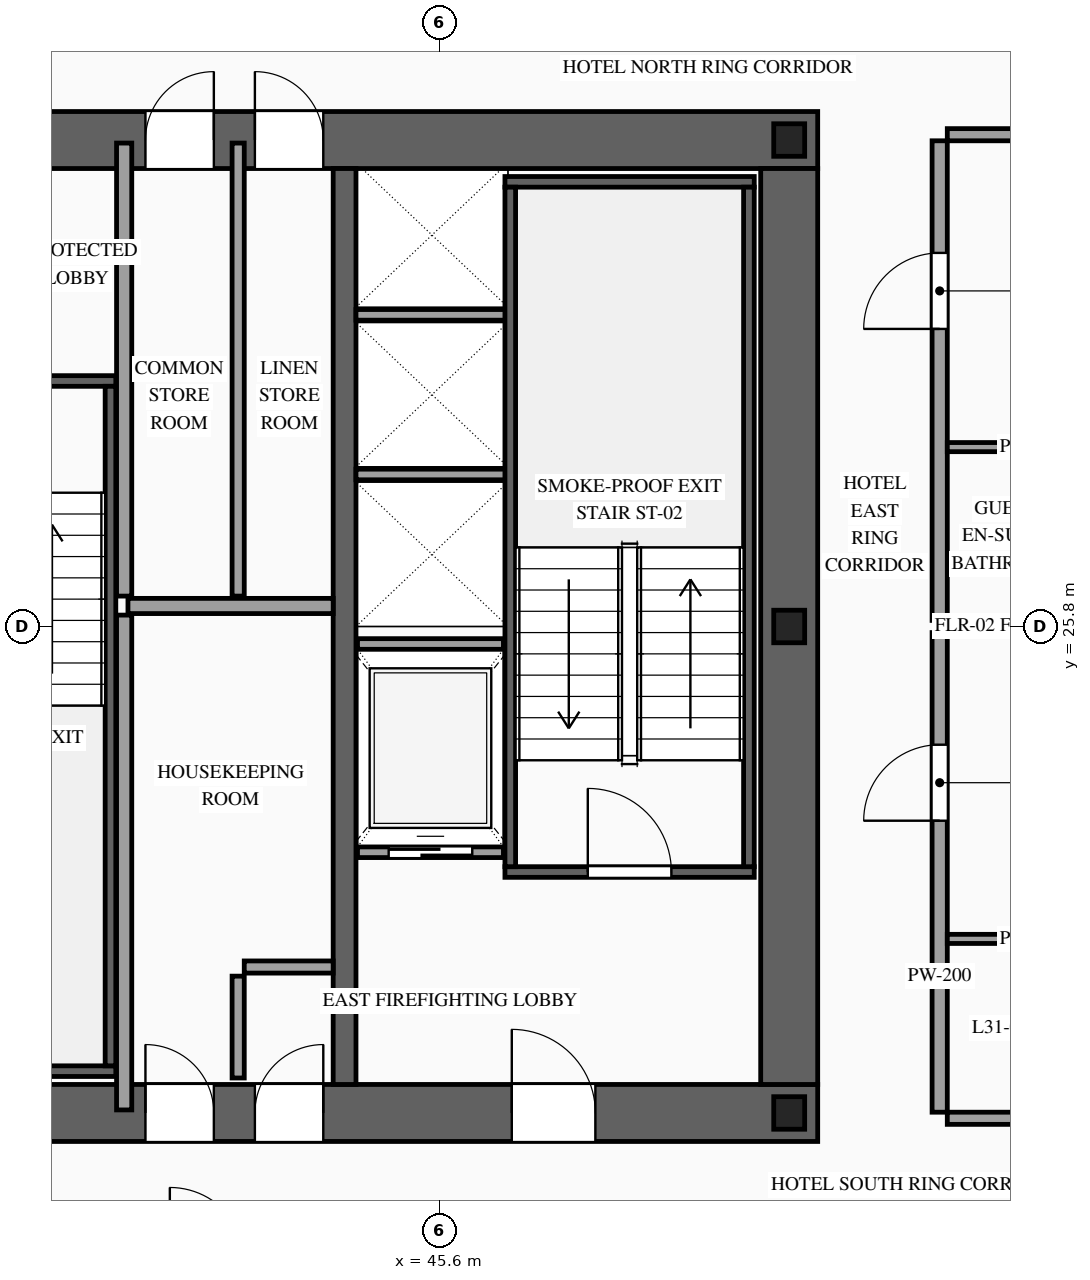
"""IFC4 building model, lengths in metres.
Left out: names, types, materials, properties, quantities, classifications, styles, units other than length and angle.
Written with IfcOpenShell. Run it as: python <this file> out.ifc"""

import sys

from ifc_helpers import new_model, si_unit, direction, frame, frame_2d, origin, origin_2d, place, context, subcontext, project, spatial, rectangle, i_section, extrude, source, transform, mapped, element, fill, save


model = new_model("IFC4")
c1 = context("Model", 3, precision=1e-05, world=origin(), true_north=direction((0.0, 1.0)))
c2 = subcontext(c1, "Body", "Model", "MODEL_VIEW")
j1 = project(units=[si_unit("LENGTHUNIT", "METRE"), si_unit("PLANEANGLEUNIT", "RADIAN")], contexts=[c1])
p1 = place(None, origin())
s1 = spatial("IfcSite", under=j1, at=p1, CompositionType="ELEMENT")
p2 = place(p1, origin())
s2 = spatial("IfcBuilding", under=s1, at=p2, CompositionType="ELEMENT")
p3 = place(p2, frame((0.0, 0.0, 119.0)))
s3 = spatial("IfcBuildingStorey", under=s2, at=p3, CompositionType="ELEMENT", Elevation=119.0)
p4 = place(p3, frame((23.425, 19.4, 0.0), z_axis=(0.0, 0.0, 1.0), x_axis=(1.0, 0.0, 0.0)))
e1 = element("IfcWall", 1, at=p4, inside=s3, PredefinedType="SHEAR", context=c2, shape_type="SweptSolid", body=[
    extrude(rectangle(XDim=27.15, YDim=0.75, at=frame_2d((13.575, 0.0))), origin(), (0.0, 0.0, 1.0), 3.6),
])
p5 = place(p4, frame((2.025, 0.0, 0.0)))
e2 = element("IfcOpeningElement", 2, at=p5, cuts=e1, PredefinedType="OPENING", context=c2, shape_type="SweptSolid", body=[
    extrude(rectangle(XDim=1.1, YDim=2.2, at=frame_2d((0.55, 1.1))), frame((0.0, 0.39, 0.0), z_axis=(0.0, -1.0, 0.0), x_axis=(1.0, 0.0, 0.0)), (0.0, 0.0, 1.0), 0.78),
])
p6 = place(p4, frame((9.925, 0.0, 0.0)))
e3 = element("IfcOpeningElement", 3, at=p6, cuts=e1, PredefinedType="OPENING", context=c2, shape_type="SweptSolid", body=[
    extrude(rectangle(XDim=1.1, YDim=2.2, at=frame_2d((0.55, 1.1))), frame((0.0, 0.39, 0.0), z_axis=(0.0, -1.0, 0.0), x_axis=(1.0, 0.0, 0.0)), (0.0, 0.0, 1.0), 0.78),
])
p7 = place(p4, frame((23.125, 0.0, 0.0)))
e4 = element("IfcOpeningElement", 4, at=p7, cuts=e1, PredefinedType="OPENING", context=c2, shape_type="SweptSolid", body=[
    extrude(rectangle(XDim=1.1, YDim=2.2, at=frame_2d((0.55, 1.1))), frame((0.0, 0.39, 0.0), z_axis=(0.0, -1.0, 0.0), x_axis=(1.0, 0.0, 0.0)), (0.0, 0.0, 1.0), 0.78),
])
p8 = place(p4, frame((19.745, 0.0, 0.0)))
e5 = element("IfcOpeningElement", 5, at=p8, cuts=e1, PredefinedType="OPENING", context=c2, shape_type="SweptSolid", body=[
    extrude(rectangle(XDim=0.9, YDim=2.15, at=frame_2d((0.45, 1.075))), frame((0.0, 0.39, 0.0), z_axis=(0.0, -1.0, 0.0), x_axis=(1.0, 0.0, 0.0)), (0.0, 0.0, 1.0), 0.78),
])
p9 = place(p4, frame((18.305, 0.0, 0.0)))
e6 = element("IfcOpeningElement", 6, at=p9, cuts=e1, PredefinedType="OPENING", context=c2, shape_type="SweptSolid", body=[
    extrude(rectangle(XDim=0.9, YDim=2.15, at=frame_2d((0.45, 1.075))), frame((0.0, 0.39, 0.0), z_axis=(0.0, -1.0, 0.0), x_axis=(1.0, 0.0, 0.0)), (0.0, 0.0, 1.0), 0.78),
])
p10 = place(p3, frame((23.425, 32.2, 0.0), z_axis=(0.0, 0.0, 1.0), x_axis=(1.0, 0.0, 0.0)))
e7 = element("IfcWall", 7, at=p10, inside=s3, PredefinedType="SHEAR", context=c2, shape_type="SweptSolid", body=[
    extrude(rectangle(XDim=27.15, YDim=0.75, at=frame_2d((13.575, 0.0))), origin(), (0.0, 0.0, 1.0), 3.6),
])
p11 = place(p10, frame((4.645, 0.0, 0.0)))
e8 = element("IfcOpeningElement", 8, at=p11, cuts=e7, PredefinedType="OPENING", context=c2, shape_type="SweptSolid", body=[
    extrude(rectangle(XDim=0.9, YDim=2.15, at=frame_2d((0.45, 1.075))), frame((0.0, 0.39, 0.0), z_axis=(0.0, -1.0, 0.0), x_axis=(1.0, 0.0, 0.0)), (0.0, 0.0, 1.0), 0.78),
])
p12 = place(p10, frame((9.925, 0.0, 0.0)))
e9 = element("IfcOpeningElement", 9, at=p12, cuts=e7, PredefinedType="OPENING", context=c2, shape_type="SweptSolid", body=[
    extrude(rectangle(XDim=1.1, YDim=2.2, at=frame_2d((0.55, 1.1))), frame((0.0, 0.39, 0.0), z_axis=(0.0, -1.0, 0.0), x_axis=(1.0, 0.0, 0.0)), (0.0, 0.0, 1.0), 0.78),
])
p13 = place(p10, frame((15.775, 0.0, 0.0)))
e10 = element("IfcOpeningElement", 10, at=p13, cuts=e7, PredefinedType="OPENING", context=c2, shape_type="SweptSolid", body=[
    extrude(rectangle(XDim=1.1, YDim=2.2, at=frame_2d((0.55, 1.1))), frame((0.0, 0.39, 0.0), z_axis=(0.0, -1.0, 0.0), x_axis=(1.0, 0.0, 0.0)), (0.0, 0.0, 1.0), 0.78),
])
p14 = place(p10, frame((18.305, 0.0, 0.0)))
e11 = element("IfcOpeningElement", 11, at=p14, cuts=e7, PredefinedType="OPENING", context=c2, shape_type="SweptSolid", body=[
    extrude(rectangle(XDim=0.9, YDim=2.15, at=frame_2d((0.45, 1.075))), frame((0.0, 0.39, 0.0), z_axis=(0.0, -1.0, 0.0), x_axis=(1.0, 0.0, 0.0)), (0.0, 0.0, 1.0), 0.78),
])
p15 = place(p10, frame((19.745, 0.0, 0.0)))
e12 = element("IfcOpeningElement", 12, at=p15, cuts=e7, PredefinedType="OPENING", context=c2, shape_type="SweptSolid", body=[
    extrude(rectangle(XDim=0.9, YDim=2.15, at=frame_2d((0.45, 1.075))), frame((0.0, 0.39, 0.0), z_axis=(0.0, -1.0, 0.0), x_axis=(1.0, 0.0, 0.0)), (0.0, 0.0, 1.0), 0.78),
])
m1 = source(origin(), c2, "Body", "SweptSolid", [
    extrude(rectangle(XDim=12.05, YDim=0.75, at=frame_2d((6.025, 0.0))), origin(), (0.0, 0.0, 1.0), 3.6),
])
p16 = place(p3, frame((50.2, 19.775, 0.0), z_axis=(0.0, 0.0, 1.0), x_axis=(0.0, 1.0, 0.0)))
e13 = element("IfcWall", 13, at=p16, inside=s3, PredefinedType="SHEAR", context=c2, shape_type="MappedRepresentation", body=[
    mapped(m1, transform((0.0, 0.0, 0.0), scale=1.0)),
])
m2 = source(origin(), c2, "Body", "SweptSolid", [
    extrude(rectangle(XDim=12.05, YDim=0.3, at=frame_2d((6.025, 0.0))), origin(), (0.0, 0.0, 1.0), 3.6),
])
p17 = place(p3, frame((44.35, 19.775, 0.0), z_axis=(0.0, 0.0, 1.0), x_axis=(0.0, 1.0, 0.0)))
e14 = element("IfcWall", 14, at=p17, inside=s3, PredefinedType="SOLIDWALL", context=c2, shape_type="MappedRepresentation", body=[
    mapped(m2, transform((0.0, 0.0, 0.0), scale=1.0)),
])
m3 = source(origin(), c2, "Body", "SweptSolid", [
    extrude(i_section(OverallWidth=0.407, OverallDepth=0.428, WebThickness=0.02, FlangeThickness=0.035, at=origin_2d()), origin(), (0.0, 0.0, 1.0), 3.6),
])
for number, where, z_axis, x_axis in (
    (15, (50.2, 19.4, 0.0), (0.0, 0.0, 1.0), (1.0, 0.0, 0.0)),
    (16, (50.2, 25.8, 0.0), (0.0, 0.0, 1.0), (1.0, 0.0, 0.0)),
    (17, (50.2, 32.2, 0.0), (0.0, 0.0, 1.0), (1.0, 0.0, 0.0)),
):
    element("IfcColumn", number, at=place(p3, frame(where, z_axis=z_axis, x_axis=x_axis)), inside=s3, PredefinedType="COLUMN", context=c2, shape_type="MappedRepresentation", body=[
        mapped(m3, transform((0.0, 0.0, 0.0), scale=1.0)),
    ])
p18 = place(p3, frame((44.52, 22.83, 0.0), z_axis=(0.0, 0.0, 1.0), x_axis=(1.0, 0.0, 0.0)))
e18 = element("IfcWall", 18, at=p18, inside=s3, PredefinedType="SOLIDWALL", context=c2, shape_type="SweptSolid", body=[
    extrude(rectangle(XDim=1.92, YDim=0.14, at=frame_2d((0.96, 0.0))), origin(), (0.0, 0.0, 1.0), 3.38),
])
p19 = place(p18, frame((0.41, 0.0, 0.0)))
e19 = element("IfcOpeningElement", 19, at=p19, cuts=e18, PredefinedType="OPENING", context=c2, shape_type="SweptSolid", body=[
    extrude(rectangle(XDim=1.1, YDim=2.2, at=frame_2d((0.55, 1.1))), frame((0.0, 0.085, 0.0), z_axis=(0.0, -1.0, 0.0), x_axis=(1.0, 0.0, 0.0)), (0.0, 0.0, 1.0), 0.17),
])
m4 = source(origin(), c2, "Body", "SweptSolid", [
    extrude(rectangle(XDim=1.92, YDim=0.14, at=frame_2d((0.96, 0.0))), origin(), (0.0, 0.0, 1.0), 3.38),
])
p20 = place(p3, frame((44.52, 25.57, 0.0), z_axis=(0.0, 0.0, 1.0), x_axis=(1.0, 0.0, 0.0)))
e20 = element("IfcWall", 20, at=p20, inside=s3, PredefinedType="SOLIDWALL", context=c2, shape_type="MappedRepresentation", body=[
    mapped(m4, transform((0.0, 0.0, 0.0), scale=1.0)),
])
m5 = source(origin(), c2, "Body", "SweptSolid", [
    extrude(rectangle(XDim=2.0, YDim=0.14, at=frame_2d((1.0, 0.0))), origin(), (0.0, 0.0, 1.0), 3.38),
])
for number, where, z_axis, x_axis in (
    (21, (44.5, 27.8, 0.0), (0.0, 0.0, 1.0), (1.0, 0.0, 0.0)),
    (22, (44.5, 29.9, 0.0), (0.0, 0.0, 1.0), (1.0, 0.0, 0.0)),
):
    element("IfcWall", number, at=place(p3, frame(where, z_axis=z_axis, x_axis=x_axis)), inside=s3, PredefinedType="SOLIDWALL", context=c2, shape_type="MappedRepresentation", body=[
        mapped(m5, transform((0.0, 0.0, 0.0), scale=1.0)),
    ])
p21 = place(p3, frame((46.46, 22.57, 0.0), z_axis=(0.0, 0.0, 1.0), x_axis=(1.0, 0.0, 0.0)))
e23 = element("IfcWall", 23, at=p21, inside=s3, PredefinedType="SOLIDWALL", context=c2, shape_type="SweptSolid", body=[
    extrude(rectangle(XDim=3.28, YDim=0.14, at=frame_2d((1.64, 0.0))), origin(), (0.0, 0.0, 1.0), 3.38),
])
p22 = place(p21, frame((1.09, 0.0, 0.0)))
e24 = element("IfcOpeningElement", 24, at=p22, cuts=e23, PredefinedType="OPENING", context=c2, shape_type="SweptSolid", body=[
    extrude(rectangle(XDim=1.1, YDim=2.2, at=frame_2d((0.55, 1.1))), frame((0.0, 0.085, 0.0), z_axis=(0.0, -1.0, 0.0), x_axis=(1.0, 0.0, 0.0)), (0.0, 0.0, 1.0), 0.17),
])
m6 = source(origin(), c2, "Body", "SweptSolid", [
    extrude(rectangle(XDim=3.28, YDim=0.14, at=frame_2d((1.64, 0.0))), origin(), (0.0, 0.0, 1.0), 3.38),
])
p23 = place(p3, frame((46.46, 31.65, 0.0), z_axis=(0.0, 0.0, 1.0), x_axis=(1.0, 0.0, 0.0)))
e25 = element("IfcWall", 25, at=p23, inside=s3, PredefinedType="SOLIDWALL", context=c2, shape_type="MappedRepresentation", body=[
    mapped(m6, transform((0.0, 0.0, 0.0), scale=1.0)),
])
m7 = source(origin(), c2, "Body", "SweptSolid", [
    extrude(rectangle(XDim=8.94, YDim=0.14, at=frame_2d((4.47, 0.0))), origin(), (0.0, 0.0, 1.0), 3.38),
])
for number, where, z_axis, x_axis in (
    (26, (46.53, 22.64, 0.0), (0.0, 0.0, 1.0), (0.0, 1.0, 0.0)),
    (27, (49.67, 22.64, 0.0), (0.0, 0.0, 1.0), (0.0, 1.0, 0.0)),
):
    element("IfcWall", number, at=place(p3, frame(where, z_axis=z_axis, x_axis=x_axis)), inside=s3, PredefinedType="SOLIDWALL", context=c2, shape_type="MappedRepresentation", body=[
        mapped(m7, transform((0.0, 0.0, 0.0), scale=1.0)),
    ])
p24 = place(p3, frame((38.2, 29.03, 0.0), z_axis=(0.0, 0.0, 1.0), x_axis=(1.0, 0.0, 0.0)))
e28 = element("IfcWall", 28, at=p24, inside=s3, PredefinedType="SOLIDWALL", context=c2, shape_type="SweptSolid", body=[
    extrude(rectangle(XDim=3.14, YDim=0.14, at=frame_2d((1.57, 0.0))), origin(), (0.0, 0.0, 1.0), 3.38),
])
p25 = place(p24, frame((1.02, 0.0, 0.0)))
e29 = element("IfcOpeningElement", 29, at=p25, cuts=e28, PredefinedType="OPENING", context=c2, shape_type="SweptSolid", body=[
    extrude(rectangle(XDim=1.1, YDim=2.2, at=frame_2d((0.55, 1.1))), frame((0.0, 0.085, 0.0), z_axis=(0.0, -1.0, 0.0), x_axis=(1.0, 0.0, 0.0)), (0.0, 0.0, 1.0), 0.17),
])
m8 = source(origin(), c2, "Body", "SweptSolid", [
    extrude(rectangle(XDim=3.14, YDim=0.14, at=frame_2d((1.57, 0.0))), origin(), (0.0, 0.0, 1.0), 3.38),
])
p26 = place(p3, frame((38.2, 19.95, 0.0), z_axis=(0.0, 0.0, 1.0), x_axis=(1.0, 0.0, 0.0)))
e30 = element("IfcWall", 30, at=p26, inside=s3, PredefinedType="SOLIDWALL", context=c2, shape_type="MappedRepresentation", body=[
    mapped(m8, transform((0.0, 0.0, 0.0), scale=1.0)),
])
m9 = source(origin(), c2, "Body", "SweptSolid", [
    extrude(rectangle(XDim=8.94, YDim=0.14, at=frame_2d((4.47, 0.0))), origin(), (0.0, 0.0, 1.0), 3.38),
])
p27 = place(p3, frame((41.27, 20.02, 0.0), z_axis=(0.0, 0.0, 1.0), x_axis=(0.0, 1.0, 0.0)))
e31 = element("IfcWall", 31, at=p27, inside=s3, PredefinedType="SOLIDWALL", context=c2, shape_type="MappedRepresentation", body=[
    mapped(m9, transform((0.0, 0.0, 0.0), scale=1.0)),
])
m10 = source(origin(), c2, "Body", "SweptSolid", [
    extrude(rectangle(XDim=1.34, YDim=0.16, at=frame_2d((0.67, 0.0))), origin(), (0.0, 0.0, 1.0), 3.38),
])
p28 = place(p3, frame((42.95, 19.86, 0.0), z_axis=(0.0, 0.0, 1.0), x_axis=(0.0, 1.0, 0.0)))
e32 = element("IfcWall", 32, at=p28, inside=s3, PredefinedType="PARTITIONING", context=c2, shape_type="MappedRepresentation", body=[
    mapped(m10, transform((0.0, 0.0, 0.0), scale=1.0)),
])
m11 = source(origin(), c2, "Body", "SweptSolid", [
    extrude(rectangle(XDim=1.17, YDim=0.16, at=frame_2d((0.585, 0.0))), origin(), (0.0, 0.0, 1.0), 3.38),
])
p29 = place(p3, frame((43.03, 21.32, 0.0), z_axis=(0.0, 0.0, 1.0), x_axis=(1.0, 0.0, 0.0)))
e33 = element("IfcWall", 33, at=p29, inside=s3, PredefinedType="PARTITIONING", context=c2, shape_type="MappedRepresentation", body=[
    mapped(m11, transform((0.0, 0.0, 0.0), scale=1.0)),
])
m12 = source(origin(), c2, "Body", "SweptSolid", [
    extrude(rectangle(XDim=6.51, YDim=0.2, at=frame_2d((3.255, 0.0))), origin(), (0.0, 0.0, 1.0), 3.38),
])
p30 = place(p3, frame((41.45, 19.44, 0.0), z_axis=(0.0, 0.0, 1.0), x_axis=(0.0, 1.0, 0.0)))
e34 = element("IfcWall", 34, at=p30, inside=s3, PredefinedType="PARTITIONING", context=c2, shape_type="MappedRepresentation", body=[
    mapped(m12, transform((0.0, 0.0, 0.0), scale=1.0)),
])
m13 = source(origin(), c2, "Body", "SweptSolid", [
    extrude(rectangle(XDim=2.7, YDim=0.2, at=frame_2d((1.35, 0.0))), origin(), (0.0, 0.0, 1.0), 3.38),
])
p31 = place(p3, frame((41.5, 26.07, 0.0), z_axis=(0.0, 0.0, 1.0), x_axis=(1.0, 0.0, 0.0)))
e35 = element("IfcWall", 35, at=p31, inside=s3, PredefinedType="PARTITIONING", context=c2, shape_type="MappedRepresentation", body=[
    mapped(m13, transform((0.0, 0.0, 0.0), scale=1.0)),
])
m14 = source(origin(), c2, "Body", "SweptSolid", [
    extrude(rectangle(XDim=5.96, YDim=0.2, at=frame_2d((2.98, 0.0))), origin(), (0.0, 0.0, 1.0), 3.38),
])
p32 = place(p3, frame((41.45, 26.2, 0.0), z_axis=(0.0, 0.0, 1.0), x_axis=(0.0, 1.0, 0.0)))
e36 = element("IfcWall", 36, at=p32, inside=s3, PredefinedType="PARTITIONING", context=c2, shape_type="MappedRepresentation", body=[
    mapped(m14, transform((0.0, 0.0, 0.0), scale=1.0)),
])
m15 = source(origin(), c2, "Body", "SweptSolid", [
    extrude(rectangle(XDim=5.96, YDim=0.16, at=frame_2d((2.98, 0.0))), origin(), (0.0, 0.0, 1.0), 3.38),
])
p33 = place(p3, frame((42.95, 26.2, 0.0), z_axis=(0.0, 0.0, 1.0), x_axis=(0.0, 1.0, 0.0)))
e37 = element("IfcWall", 37, at=p33, inside=s3, PredefinedType="PARTITIONING", context=c2, shape_type="MappedRepresentation", body=[
    mapped(m15, transform((0.0, 0.0, 0.0), scale=1.0)),
])
p34 = place(p3, frame((52.18, 19.41, 0.0), z_axis=(0.0, 0.0, 1.0), x_axis=(0.0, 1.0, 0.0)))
e38 = element("IfcWall", 38, at=p34, inside=s3, PredefinedType="PARTITIONING", context=c2, shape_type="SweptSolid", body=[
    extrude(rectangle(XDim=6.31, YDim=0.2, at=frame_2d((3.155, 0.0))), origin(), (0.0, 0.0, 1.0), 3.38),
])
p35 = place(p34, frame((3.835, 0.0, 0.0)))
e39 = element("IfcOpeningElement", 39, at=p35, cuts=e38, PredefinedType="OPENING", context=c2, shape_type="SweptSolid", body=[
    extrude(rectangle(XDim=1.0, YDim=2.2, at=frame_2d((0.5, 1.1))), frame((0.0, 0.115, 0.0), z_axis=(0.0, -1.0, 0.0), x_axis=(1.0, 0.0, 0.0)), (0.0, 0.0, 1.0), 0.23),
])
m16 = source(origin(), c2, "Body", "SweptSolid", [
    extrude(rectangle(XDim=8.17, YDim=0.16, at=frame_2d((4.085, 0.0))), origin(), (0.0, 0.0, 1.0), 2.675),
])
p36 = place(p3, frame((52.28, 25.8, 0.0), z_axis=(0.0, 0.0, 1.0), x_axis=(1.0, 0.0, 0.0)))
e40 = element("IfcWall", 40, at=p36, inside=s3, PredefinedType="PARTITIONING", context=c2, shape_type="MappedRepresentation", body=[
    mapped(m16, transform((0.0, 0.0, 0.0), scale=1.0)),
])
m17 = source(origin(), c2, "Body", "SweptSolid", [
    extrude(rectangle(XDim=8.17, YDim=0.16, at=frame_2d((4.085, 0.0))), origin(), (0.0, 0.0, 1.0), 2.875),
])
p37 = place(p3, frame((52.28, 19.33, 0.0), z_axis=(0.0, 0.0, 1.0), x_axis=(1.0, 0.0, 0.0)))
e41 = element("IfcWall", 41, at=p37, inside=s3, PredefinedType="PARTITIONING", context=c2, shape_type="MappedRepresentation", body=[
    mapped(m17, transform((0.0, 0.0, 0.0), scale=1.0)),
])
m18 = source(origin(), c2, "Body", "SweptSolid", [
    extrude(rectangle(XDim=2.22, YDim=0.12, at=frame_2d((1.11, 0.0))), origin(), (0.0, 0.0, 1.0), 3.38),
])
p38 = place(p3, frame((52.28, 21.69, 0.0), z_axis=(0.0, 0.0, 1.0), x_axis=(1.0, 0.0, 0.0)))
e42 = element("IfcWall", 42, at=p38, inside=s3, PredefinedType="PARTITIONING", context=c2, shape_type="MappedRepresentation", body=[
    mapped(m18, transform((0.0, 0.0, 0.0), scale=1.0)),
])
p39 = place(p3, frame((52.18, 25.88, 0.0), z_axis=(0.0, 0.0, 1.0), x_axis=(0.0, 1.0, 0.0)))
e43 = element("IfcWall", 43, at=p39, inside=s3, PredefinedType="PARTITIONING", context=c2, shape_type="SweptSolid", body=[
    extrude(rectangle(XDim=6.31, YDim=0.2, at=frame_2d((3.155, 0.0))), origin(), (0.0, 0.0, 1.0), 3.38),
])
p40 = place(p39, frame((3.835, 0.0, 0.0)))
e44 = element("IfcOpeningElement", 44, at=p40, cuts=e43, PredefinedType="OPENING", context=c2, shape_type="SweptSolid", body=[
    extrude(rectangle(XDim=1.0, YDim=2.2, at=frame_2d((0.5, 1.1))), frame((0.0, 0.115, 0.0), z_axis=(0.0, -1.0, 0.0), x_axis=(1.0, 0.0, 0.0)), (0.0, 0.0, 1.0), 0.23),
])
p41 = place(p3, frame((52.28, 32.27, 0.0), z_axis=(0.0, 0.0, 1.0), x_axis=(1.0, 0.0, 0.0)))
e45 = element("IfcWall", 45, at=p41, inside=s3, PredefinedType="PARTITIONING", context=c2, shape_type="MappedRepresentation", body=[
    mapped(m17, transform((0.0, 0.0, 0.0), scale=1.0)),
])
p42 = place(p3, frame((52.28, 28.16, 0.0), z_axis=(0.0, 0.0, 1.0), x_axis=(1.0, 0.0, 0.0)))
e46 = element("IfcWall", 46, at=p42, inside=s3, PredefinedType="PARTITIONING", context=c2, shape_type="MappedRepresentation", body=[
    mapped(m18, transform((0.0, 0.0, 0.0), scale=1.0)),
])
m19 = source(origin(), c2, "Body", "SweptSolid", [
    extrude(rectangle(XDim=1.1, YDim=2.2, at=frame_2d((0.55, 1.1))), frame((0.0, 0.025, 0.0), z_axis=(0.0, -1.0, 0.0), x_axis=(1.0, 0.0, 0.0)), (0.0, 0.0, 1.0), 0.05),
])
p43 = place(p19, origin())
e47 = element("IfcDoor", 47, at=p43, inside=s3, OperationType="SLIDING_TO_RIGHT", PredefinedType="DOOR", context=c2, shape_type="MappedRepresentation", body=[
    mapped(m19, transform((0.0, 0.0, 0.0), scale=1.0)),
])
fill(e19, e47)
m20 = source(origin(), c2, "Body", "SweptSolid", [
    extrude(rectangle(XDim=1.1, YDim=2.2, at=frame_2d((0.55, 1.1))), frame((0.0, 0.025, 0.0), z_axis=(0.0, -1.0, 0.0), x_axis=(1.0, 0.0, 0.0)), (0.0, 0.0, 1.0), 0.05),
])
p44 = place(p22, origin())
e48 = element("IfcDoor", 48, at=p44, inside=s3, OperationType="SINGLE_SWING_LEFT", PredefinedType="DOOR", context=c2, shape_type="MappedRepresentation", body=[
    mapped(m20, transform((0.0, 0.0, 0.0), scale=1.0)),
])
fill(e24, e48)
p45 = place(p7, origin())
e49 = element("IfcDoor", 49, at=p45, inside=s3, OperationType="SINGLE_SWING_LEFT", PredefinedType="DOOR", context=c2, shape_type="MappedRepresentation", body=[
    mapped(m20, transform((0.0, 0.0, 0.0), scale=1.0)),
])
fill(e4, e49)
m21 = source(origin(), c2, "Body", "SweptSolid", [
    extrude(rectangle(XDim=0.9, YDim=2.15, at=frame_2d((0.45, 1.075))), frame((0.0, 0.025, 0.0), z_axis=(0.0, -1.0, 0.0), x_axis=(1.0, 0.0, 0.0)), (0.0, 0.0, 1.0), 0.05),
])
p46 = place(p8, origin())
e50 = element("IfcDoor", 50, at=p46, inside=s3, OperationType="SINGLE_SWING_RIGHT", PredefinedType="DOOR", context=c2, shape_type="MappedRepresentation", body=[
    mapped(m21, transform((0.0, 0.0, 0.0), scale=1.0)),
])
fill(e5, e50)
p47 = place(p9, origin())
e51 = element("IfcDoor", 51, at=p47, inside=s3, OperationType="SINGLE_SWING_LEFT", PredefinedType="DOOR", context=c2, shape_type="MappedRepresentation", body=[
    mapped(m21, transform((0.0, 0.0, 0.0), scale=1.0)),
])
fill(e6, e51)
p48 = place(p14, origin())
e52 = element("IfcDoor", 52, at=p48, inside=s3, OperationType="SINGLE_SWING_RIGHT", PredefinedType="DOOR", context=c2, shape_type="MappedRepresentation", body=[
    mapped(m21, transform((0.0, 0.0, 0.0), scale=1.0)),
])
fill(e11, e52)
p49 = place(p15, origin())
e53 = element("IfcDoor", 53, at=p49, inside=s3, OperationType="SINGLE_SWING_LEFT", PredefinedType="DOOR", context=c2, shape_type="MappedRepresentation", body=[
    mapped(m21, transform((0.0, 0.0, 0.0), scale=1.0)),
])
fill(e12, e53)
m22 = source(origin(), c2, "Body", "SweptSolid", [
    extrude(rectangle(XDim=1.0, YDim=2.2, at=frame_2d((0.5, 1.1))), frame((0.0, 0.025, 0.0), z_axis=(0.0, -1.0, 0.0), x_axis=(1.0, 0.0, 0.0)), (0.0, 0.0, 1.0), 0.05),
])
p50 = place(p35, origin())
e54 = element("IfcDoor", 54, at=p50, inside=s3, OperationType="SINGLE_SWING_LEFT", PredefinedType="DOOR", context=c2, shape_type="MappedRepresentation", body=[
    mapped(m22, transform((0.0, 0.0, 0.0), scale=1.0)),
])
fill(e39, e54)
p51 = place(p40, origin())
e55 = element("IfcDoor", 55, at=p51, inside=s3, OperationType="SINGLE_SWING_LEFT", PredefinedType="DOOR", context=c2, shape_type="MappedRepresentation", body=[
    mapped(m22, transform((0.0, 0.0, 0.0), scale=1.0)),
])
fill(e44, e55)
save(model, sys.argv[1])
